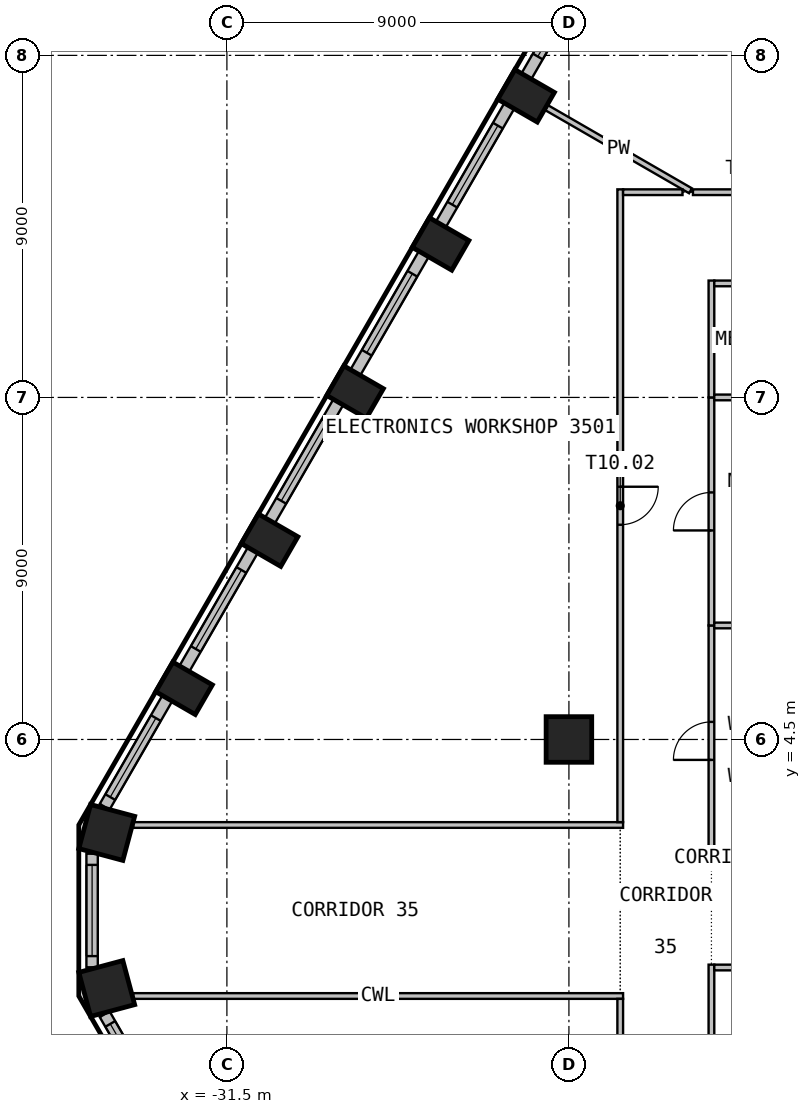
"""IFC4 building model, lengths in metres.
Left out: names, types, materials, properties, quantities, classifications, styles, units other than length and angle.
Written with IfcOpenShell. Run it as: python <this file> out.ifc"""

import sys

from ifc_helpers import new_model, si_unit, direction, frame, frame_2d, origin, origin_2d, place, context, subcontext, project, spatial, rectangle, circle, extrude, element, fill, save


model = new_model("IFC4")
c1 = context("Model", 3, precision=1e-05, world=origin(), true_north=direction((0.0, 1.0)))
c2 = subcontext(c1, "Body", "Model", "MODEL_VIEW")
j1 = project(units=[si_unit("LENGTHUNIT", "METRE"), si_unit("PLANEANGLEUNIT", "RADIAN")], contexts=[c1])
p1 = place(None, origin())
s1 = spatial("IfcSite", under=j1, at=p1, CompositionType="ELEMENT")
p2 = place(p1, origin())
s2 = spatial("IfcBuilding", under=s1, at=p2, CompositionType="ELEMENT")
p3 = place(p2, frame((0.0, 0.0, 144.3)))
s3 = spatial("IfcBuildingStorey", under=s2, at=p3, CompositionType="ELEMENT", Elevation=144.3)
for number, where, z_axis, x_axis in (
    (1, (-23.627, 21.436, 0.0), (0.0, 0.0, 1.0), (-0.5, -0.866, 0.0)),
    (2, (-25.877, 17.539, 0.0), (0.0, 0.0, 1.0), (-0.5, -0.866, 0.0)),
    (3, (-28.127, 13.641, 0.0), (0.0, 0.0, 1.0), (-0.5, -0.866, 0.0)),
    (4, (-30.377, 9.744, 0.0), (0.0, 0.0, 1.0), (-0.5, -0.866, 0.0)),
    (5, (-32.627, 5.847, 0.0), (0.0, 0.0, 1.0), (-0.5, -0.866, 0.0)),
):
    element("IfcColumn", number, at=place(p3, frame(where, z_axis=z_axis, x_axis=x_axis)), inside=s3, PredefinedType="COLUMN", context=c2, shape_type="SweptSolid", body=[
        extrude(rectangle(XDim=0.9, YDim=1.2, at=origin_2d()), origin(), (0.0, 0.0, 1.0), 3.575),
    ])
for number, where, z_axis, x_axis in (
    (6, (-34.662, 2.053, 0.0), (0.0, 0.0, 1.0), (-0.259, -0.966, 0.0)),
    (7, (-34.662, -2.053, 0.0), (0.0, 0.0, 1.0), (0.259, -0.966, 0.0)),
):
    element("IfcColumn", number, at=place(p3, frame(where, z_axis=z_axis, x_axis=x_axis)), inside=s3, PredefinedType="COLUMN", context=c2, shape_type="SweptSolid", body=[
        extrude(rectangle(XDim=1.2, YDim=1.2, at=origin_2d()), origin(), (0.0, 0.0, 1.0), 3.575),
    ])
p4 = place(p3, frame((-22.5, 4.5, 0.0), z_axis=(0.0, 0.0, 1.0), x_axis=(1.0, 0.0, 0.0)))
e8 = element("IfcColumn", 8, at=p4, inside=s3, PredefinedType="COLUMN", context=c2, shape_type="SweptSolid", body=[
    extrude(circle(Radius=0.6, at=origin_2d()), origin(), (0.0, 0.0, 1.0), 3.575),
])
p5 = place(p3, frame((-21.972, 24.803, 0.0), z_axis=(0.0, 0.0, 1.0), x_axis=(-0.500036802197, -0.866004154983, 0.0)))
e9 = element("IfcWall", 9, at=p5, inside=s3, PredefinedType="SOLIDWALL", context=c2, shape_type="SweptSolid", body=[
    extrude(rectangle(XDim=3.294, YDim=0.3, at=frame_2d((1.647, 0.0))), origin(), (0.0, 0.0, 1.0), 3.575),
])
p6 = place(p5, frame((0.294, 0.0, 0.9)))
e10 = element("IfcOpeningElement", 10, at=p6, cuts=e9, PredefinedType="OPENING", context=c2, shape_type="SweptSolid", body=[
    extrude(rectangle(XDim=2.4, YDim=2.1, at=frame_2d((1.2, 1.05))), frame((0.0, 0.16, 0.0), z_axis=(0.0, -1.0, 0.0), x_axis=(1.0, 0.0, 0.0)), (0.0, 0.0, 1.0), 0.32),
])
p7 = place(p3, frame((-24.069, 21.17, 0.0), z_axis=(0.0, 0.0, 1.0), x_axis=(-0.500027802648, -0.866009351323, 0.0)))
e11 = element("IfcWall", 11, at=p7, inside=s3, PredefinedType="SOLIDWALL", context=c2, shape_type="SweptSolid", body=[
    extrude(rectangle(XDim=3.599, YDim=0.3, at=frame_2d((1.799, 0.0))), origin(), (0.0, 0.0, 1.0), 3.575),
])
p8 = place(p7, frame((0.6, 0.0, 0.9)))
e12 = element("IfcOpeningElement", 12, at=p8, cuts=e11, PredefinedType="OPENING", context=c2, shape_type="SweptSolid", body=[
    extrude(rectangle(XDim=2.4, YDim=2.1, at=frame_2d((1.2, 1.05))), frame((0.0, 0.16, 0.0), z_axis=(0.0, -1.0, 0.0), x_axis=(1.0, 0.0, 0.0)), (0.0, 0.0, 1.0), 0.32),
])
p9 = place(p3, frame((-26.319, 17.273, 0.0), z_axis=(0.0, 0.0, 1.0), x_axis=(-0.500027802648, -0.866009351323, 0.0)))
e13 = element("IfcWall", 13, at=p9, inside=s3, PredefinedType="SOLIDWALL", context=c2, shape_type="SweptSolid", body=[
    extrude(rectangle(XDim=3.599, YDim=0.3, at=frame_2d((1.799, 0.0))), origin(), (0.0, 0.0, 1.0), 3.575),
])
p10 = place(p9, frame((0.6, 0.0, 0.9)))
e14 = element("IfcOpeningElement", 14, at=p10, cuts=e13, PredefinedType="OPENING", context=c2, shape_type="SweptSolid", body=[
    extrude(rectangle(XDim=2.4, YDim=2.1, at=frame_2d((1.2, 1.05))), frame((0.0, 0.16, 0.0), z_axis=(0.0, -1.0, 0.0), x_axis=(1.0, 0.0, 0.0)), (0.0, 0.0, 1.0), 0.32),
])
p11 = place(p3, frame((-28.569, 13.376, 0.0), z_axis=(0.0, 0.0, 1.0), x_axis=(-0.500027802648, -0.866009351323, 0.0)))
e15 = element("IfcWall", 15, at=p11, inside=s3, PredefinedType="SOLIDWALL", context=c2, shape_type="SweptSolid", body=[
    extrude(rectangle(XDim=3.599, YDim=0.3, at=frame_2d((1.799, 0.0))), origin(), (0.0, 0.0, 1.0), 3.575),
])
p12 = place(p11, frame((0.6, 0.0, 0.9)))
e16 = element("IfcOpeningElement", 16, at=p12, cuts=e15, PredefinedType="OPENING", context=c2, shape_type="SweptSolid", body=[
    extrude(rectangle(XDim=2.4, YDim=2.1, at=frame_2d((1.2, 1.05))), frame((0.0, 0.16, 0.0), z_axis=(0.0, -1.0, 0.0), x_axis=(1.0, 0.0, 0.0)), (0.0, 0.0, 1.0), 0.32),
])
p13 = place(p3, frame((-30.819, 9.479, 0.0), z_axis=(0.0, 0.0, 1.0), x_axis=(-0.500027802648, -0.866009351323, 0.0)))
e17 = element("IfcWall", 17, at=p13, inside=s3, PredefinedType="SOLIDWALL", context=c2, shape_type="SweptSolid", body=[
    extrude(rectangle(XDim=3.599, YDim=0.3, at=frame_2d((1.799, 0.0))), origin(), (0.0, 0.0, 1.0), 3.575),
])
p14 = place(p13, frame((0.6, 0.0, 0.9)))
e18 = element("IfcOpeningElement", 18, at=p14, cuts=e17, PredefinedType="OPENING", context=c2, shape_type="SweptSolid", body=[
    extrude(rectangle(XDim=2.4, YDim=2.1, at=frame_2d((1.2, 1.05))), frame((0.0, 0.16, 0.0), z_axis=(0.0, -1.0, 0.0), x_axis=(1.0, 0.0, 0.0)), (0.0, 0.0, 1.0), 0.32),
])
p15 = place(p3, frame((-33.069, 5.582, 0.0), z_axis=(0.0, 0.0, 1.0), x_axis=(-0.499981217486, -0.866036247602, 0.0)))
e19 = element("IfcWall", 19, at=p15, inside=s3, PredefinedType="SOLIDWALL", context=c2, shape_type="SweptSolid", body=[
    extrude(rectangle(XDim=3.294, YDim=0.3, at=frame_2d((1.647, 0.0))), origin(), (0.0, 0.0, 1.0), 3.575),
])
p16 = place(p15, frame((0.6, 0.0, 0.9)))
e20 = element("IfcOpeningElement", 20, at=p16, cuts=e19, PredefinedType="OPENING", context=c2, shape_type="SweptSolid", body=[
    extrude(rectangle(XDim=2.4, YDim=2.1, at=frame_2d((1.2, 1.05))), frame((0.0, 0.16, 0.0), z_axis=(0.0, -1.0, 0.0), x_axis=(1.0, 0.0, 0.0)), (0.0, 0.0, 1.0), 0.32),
])
p17 = place(p3, frame((-35.047, 1.495, 0.0), z_axis=(0.0, 0.0, 1.0), x_axis=(0.0, -1.0, 0.0)))
e21 = element("IfcWall", 21, at=p17, inside=s3, PredefinedType="SOLIDWALL", context=c2, shape_type="SweptSolid", body=[
    extrude(rectangle(XDim=2.989, YDim=0.3, at=frame_2d((1.495, 0.0))), origin(), (0.0, 0.0, 1.0), 3.575),
])
p18 = place(p17, frame((0.295, 0.0, 0.9)))
e22 = element("IfcOpeningElement", 22, at=p18, cuts=e21, PredefinedType="OPENING", context=c2, shape_type="SweptSolid", body=[
    extrude(rectangle(XDim=2.4, YDim=2.1, at=frame_2d((1.2, 1.05))), frame((0.0, 0.16, 0.0), z_axis=(0.0, -1.0, 0.0), x_axis=(1.0, 0.0, 0.0)), (0.0, 0.0, 1.0), 0.32),
])
p19 = place(p3, frame((-34.716, -2.729, 0.0), z_axis=(0.0, 0.0, 1.0), x_axis=(0.499981217486, -0.866036247602, 0.0)))
e23 = element("IfcWall", 23, at=p19, inside=s3, PredefinedType="SOLIDWALL", context=c2, shape_type="SweptSolid", body=[
    extrude(rectangle(XDim=3.294, YDim=0.3, at=frame_2d((1.647, 0.0))), origin(), (0.0, 0.0, 1.0), 3.575),
])
p20 = place(p19, frame((0.295, 0.0, 0.9)))
e24 = element("IfcOpeningElement", 24, at=p20, cuts=e23, PredefinedType="OPENING", context=c2, shape_type="SweptSolid", body=[
    extrude(rectangle(XDim=2.4, YDim=2.1, at=frame_2d((1.2, 1.05))), frame((0.0, 0.16, 0.0), z_axis=(0.0, -1.0, 0.0), x_axis=(1.0, 0.0, 0.0)), (0.0, 0.0, 1.0), 0.32),
])
for number, where, z_axis, x_axis in (
    (25, (-21.075, -2.25, 0.0), (0.0, 0.0, 1.0), (-1.0, 0.0, 0.0)),
    (26, (-33.968, 2.25, 0.0), (0.0, 0.0, 1.0), (1.0, 0.0, 0.0)),
):
    element("IfcWall", number, at=place(p3, frame(where, z_axis=z_axis, x_axis=x_axis)), inside=s3, PredefinedType="PARTITIONING", context=c2, shape_type="SweptSolid", body=[
        extrude(rectangle(XDim=12.893, YDim=0.15, at=frame_2d((6.446, 0.0))), origin(), (0.0, 0.0, 1.0), 3.575),
    ])
p21 = place(p3, frame((-23.09, 21.126, 0.0), z_axis=(0.0, 0.0, 1.0), x_axis=(0.865968165673, -0.500099126214, 0.0)))
e27 = element("IfcWall", 27, at=p21, inside=s3, PredefinedType="PARTITIONING", context=c2, shape_type="SweptSolid", body=[
    extrude(rectangle(XDim=4.376, YDim=0.15, at=frame_2d((2.188, 0.0))), origin(), (0.0, 0.0, 1.0), 3.575),
])
p22 = place(p3, frame((-21.15, -2.325, 0.0), z_axis=(0.0, 0.0, 1.0), x_axis=(0.0, -1.0, 0.0)))
e28 = element("IfcWall", 28, at=p22, inside=s3, PredefinedType="PARTITIONING", context=c2, shape_type="SweptSolid", body=[
    extrude(rectangle(XDim=16.65, YDim=0.15, at=frame_2d((8.325, 0.0))), origin(), (0.0, 0.0, 1.0), 3.575),
])
p23 = place(p22, frame((7.825, 0.0, 0.0)))
e29 = element("IfcOpeningElement", 29, at=p23, cuts=e28, PredefinedType="OPENING", context=c2, shape_type="SweptSolid", body=[
    extrude(rectangle(XDim=1.0, YDim=2.1, at=frame_2d((0.5, 1.05))), frame((0.0, 0.085, 0.0), z_axis=(0.0, -1.0, 0.0), x_axis=(1.0, 0.0, 0.0)), (0.0, 0.0, 1.0), 0.17),
])
p24 = place(p3, frame((-21.15, 18.975, 0.0), z_axis=(0.0, 0.0, 1.0), x_axis=(0.0, -1.0, 0.0)))
e30 = element("IfcWall", 30, at=p24, inside=s3, PredefinedType="PARTITIONING", context=c2, shape_type="SweptSolid", body=[
    extrude(rectangle(XDim=16.65, YDim=0.15, at=frame_2d((8.325, 0.0))), origin(), (0.0, 0.0, 1.0), 3.575),
])
p25 = place(p24, frame((7.825, 0.0, 0.0)))
e31 = element("IfcOpeningElement", 31, at=p25, cuts=e30, PredefinedType="OPENING", context=c2, shape_type="SweptSolid", body=[
    extrude(rectangle(XDim=1.0, YDim=2.1, at=frame_2d((0.5, 1.05))), frame((0.0, 0.085, 0.0), z_axis=(0.0, -1.0, 0.0), x_axis=(1.0, 0.0, 0.0)), (0.0, 0.0, 1.0), 0.17),
])
p26 = place(p3, frame((-19.511, 18.9, 0.0), z_axis=(0.0, 0.0, 1.0), x_axis=(-1.0, 0.0, 0.0)))
e32 = element("IfcWall", 32, at=p26, inside=s3, PredefinedType="PARTITIONING", context=c2, shape_type="SweptSolid", body=[
    extrude(rectangle(XDim=1.564, YDim=0.15, at=frame_2d((0.782, 0.0))), origin(), (0.0, 0.0, 1.0), 3.575),
])
p27 = place(p3, frame((-15.688, 18.9, 0.0), z_axis=(0.0, 0.0, 1.0), x_axis=(-1.0, 0.0, 0.0)))
e33 = element("IfcWall", 33, at=p27, inside=s3, PredefinedType="PARTITIONING", context=c2, shape_type="SweptSolid", body=[
    extrude(rectangle(XDim=3.548, YDim=0.15, at=frame_2d((1.774, 0.0))), origin(), (0.0, 0.0, 1.0), 3.575),
])
p28 = place(p27, frame((1.274, 0.0, 0.0)))
e34 = element("IfcOpeningElement", 34, at=p28, cuts=e33, PredefinedType="OPENING", context=c2, shape_type="SweptSolid", body=[
    extrude(rectangle(XDim=1.0, YDim=2.1, at=frame_2d((0.5, 1.05))), frame((0.0, 0.085, 0.0), z_axis=(0.0, -1.0, 0.0), x_axis=(1.0, 0.0, 0.0)), (0.0, 0.0, 1.0), 0.17),
])
p29 = place(p3, frame((-18.75, -13.5, 0.0), z_axis=(0.0, 0.0, 1.0), x_axis=(0.0, 1.0, 0.0)))
e35 = element("IfcWall", 35, at=p29, inside=s3, PredefinedType="PARTITIONING", context=c2, shape_type="SweptSolid", body=[
    extrude(rectangle(XDim=12.075, YDim=0.15, at=frame_2d((6.038, 0.0))), origin(), (0.0, 0.0, 1.0), 3.575),
])
p30 = place(p29, frame((5.538, 0.0, 0.0)))
e36 = element("IfcOpeningElement", 36, at=p30, cuts=e35, PredefinedType="OPENING", context=c2, shape_type="SweptSolid", body=[
    extrude(rectangle(XDim=1.0, YDim=2.1, at=frame_2d((0.5, 1.05))), frame((0.0, 0.085, 0.0), z_axis=(0.0, -1.0, 0.0), x_axis=(1.0, 0.0, 0.0)), (0.0, 0.0, 1.0), 0.17),
])
p31 = place(p3, frame((-18.675, -1.5, 0.0), z_axis=(0.0, 0.0, 1.0), x_axis=(1.0, 0.0, 0.0)))
e37 = element("IfcWall", 37, at=p31, inside=s3, PredefinedType="PARTITIONING", context=c2, shape_type="SweptSolid", body=[
    extrude(rectangle(XDim=2.925, YDim=0.15, at=frame_2d((1.462, 0.0))), origin(), (0.0, 0.0, 1.0), 3.575),
])
p32 = place(p3, frame((-18.75, 1.425, 0.0), z_axis=(0.0, 0.0, 1.0), x_axis=(0.0, 1.0, 0.0)))
e38 = element("IfcWall", 38, at=p32, inside=s3, PredefinedType="PARTITIONING", context=c2, shape_type="SweptSolid", body=[
    extrude(rectangle(XDim=6.075, YDim=0.15, at=frame_2d((3.038, 0.0))), origin(), (0.0, 0.0, 1.0), 3.575),
])
p33 = place(p32, frame((2.538, 0.0, 0.0)))
e39 = element("IfcOpeningElement", 39, at=p33, cuts=e38, PredefinedType="OPENING", context=c2, shape_type="SweptSolid", body=[
    extrude(rectangle(XDim=1.0, YDim=2.1, at=frame_2d((0.5, 1.05))), frame((0.0, 0.085, 0.0), z_axis=(0.0, -1.0, 0.0), x_axis=(1.0, 0.0, 0.0)), (0.0, 0.0, 1.0), 0.17),
])
p34 = place(p3, frame((-15.75, 1.5, 0.0), z_axis=(0.0, 0.0, 1.0), x_axis=(-1.0, 0.0, 0.0)))
e40 = element("IfcWall", 40, at=p34, inside=s3, PredefinedType="PARTITIONING", context=c2, shape_type="SweptSolid", body=[
    extrude(rectangle(XDim=2.925, YDim=0.15, at=frame_2d((1.462, 0.0))), origin(), (0.0, 0.0, 1.0), 3.575),
])
p35 = place(p3, frame((-18.75, 7.5, 0.0), z_axis=(0.0, 0.0, 1.0), x_axis=(0.0, 1.0, 0.0)))
e41 = element("IfcWall", 41, at=p35, inside=s3, PredefinedType="PARTITIONING", context=c2, shape_type="SweptSolid", body=[
    extrude(rectangle(XDim=6.0, YDim=0.15, at=frame_2d((3.0, 0.0))), origin(), (0.0, 0.0, 1.0), 3.575),
])
p36 = place(p35, frame((2.5, 0.0, 0.0)))
e42 = element("IfcOpeningElement", 42, at=p36, cuts=e41, PredefinedType="OPENING", context=c2, shape_type="SweptSolid", body=[
    extrude(rectangle(XDim=1.0, YDim=2.1, at=frame_2d((0.5, 1.05))), frame((0.0, 0.085, 0.0), z_axis=(0.0, -1.0, 0.0), x_axis=(1.0, 0.0, 0.0)), (0.0, 0.0, 1.0), 0.17),
])
p37 = place(p3, frame((-18.675, 7.5, 0.0), z_axis=(0.0, 0.0, 1.0), x_axis=(1.0, 0.0, 0.0)))
e43 = element("IfcWall", 43, at=p37, inside=s3, PredefinedType="PARTITIONING", context=c2, shape_type="SweptSolid", body=[
    extrude(rectangle(XDim=2.925, YDim=0.15, at=frame_2d((1.462, 0.0))), origin(), (0.0, 0.0, 1.0), 3.575),
])
p38 = place(p3, frame((-18.75, 13.5, 0.0), z_axis=(0.0, 0.0, 1.0), x_axis=(0.0, 1.0, 0.0)))
e44 = element("IfcWall", 44, at=p38, inside=s3, PredefinedType="PARTITIONING", context=c2, shape_type="SweptSolid", body=[
    extrude(rectangle(XDim=3.075, YDim=0.15, at=frame_2d((1.538, 0.0))), origin(), (0.0, 0.0, 1.0), 3.575),
])
p39 = place(p3, frame((-18.675, 13.5, 0.0), z_axis=(0.0, 0.0, 1.0), x_axis=(1.0, 0.0, 0.0)))
e45 = element("IfcWall", 45, at=p39, inside=s3, PredefinedType="PARTITIONING", context=c2, shape_type="SweptSolid", body=[
    extrude(rectangle(XDim=2.925, YDim=0.15, at=frame_2d((1.462, 0.0))), origin(), (0.0, 0.0, 1.0), 3.575),
])
p40 = place(p3, frame((-18.675, 16.5, 0.0), z_axis=(0.0, 0.0, 1.0), x_axis=(1.0, 0.0, 0.0)))
e46 = element("IfcWall", 46, at=p40, inside=s3, PredefinedType="PARTITIONING", context=c2, shape_type="SweptSolid", body=[
    extrude(rectangle(XDim=5.4, YDim=0.15, at=frame_2d((2.7, 0.0))), origin(), (0.0, 0.0, 1.0), 3.575),
])
p41 = place(p40, frame((2.2, 0.0, 0.0)))
e47 = element("IfcOpeningElement", 47, at=p41, cuts=e46, PredefinedType="OPENING", context=c2, shape_type="SweptSolid", body=[
    extrude(rectangle(XDim=1.0, YDim=2.1, at=frame_2d((0.5, 1.05))), frame((0.0, 0.085, 0.0), z_axis=(0.0, -1.0, 0.0), x_axis=(1.0, 0.0, 0.0)), (0.0, 0.0, 1.0), 0.17),
])
p42 = place(p6, origin())
e48 = element("IfcWindow", 48, at=p42, inside=s3, PartitioningType="SINGLE_PANEL", PredefinedType="WINDOW", context=c2, shape_type="SweptSolid", body=[
    extrude(rectangle(XDim=2.4, YDim=2.1, at=frame_2d((1.2, 1.05))), frame((0.0, 0.03, 0.0), z_axis=(0.0, -1.0, 0.0), x_axis=(1.0, 0.0, 0.0)), (0.0, 0.0, 1.0), 0.06),
])
fill(e10, e48)
p43 = place(p8, origin())
e49 = element("IfcWindow", 49, at=p43, inside=s3, PartitioningType="SINGLE_PANEL", PredefinedType="WINDOW", context=c2, shape_type="SweptSolid", body=[
    extrude(rectangle(XDim=2.4, YDim=2.1, at=frame_2d((1.2, 1.05))), frame((0.0, 0.03, 0.0), z_axis=(0.0, -1.0, 0.0), x_axis=(1.0, 0.0, 0.0)), (0.0, 0.0, 1.0), 0.06),
])
fill(e12, e49)
p44 = place(p10, origin())
e50 = element("IfcWindow", 50, at=p44, inside=s3, PartitioningType="SINGLE_PANEL", PredefinedType="WINDOW", context=c2, shape_type="SweptSolid", body=[
    extrude(rectangle(XDim=2.4, YDim=2.1, at=frame_2d((1.2, 1.05))), frame((0.0, 0.03, 0.0), z_axis=(0.0, -1.0, 0.0), x_axis=(1.0, 0.0, 0.0)), (0.0, 0.0, 1.0), 0.06),
])
fill(e14, e50)
p45 = place(p12, origin())
e51 = element("IfcWindow", 51, at=p45, inside=s3, PartitioningType="SINGLE_PANEL", PredefinedType="WINDOW", context=c2, shape_type="SweptSolid", body=[
    extrude(rectangle(XDim=2.4, YDim=2.1, at=frame_2d((1.2, 1.05))), frame((0.0, 0.03, 0.0), z_axis=(0.0, -1.0, 0.0), x_axis=(1.0, 0.0, 0.0)), (0.0, 0.0, 1.0), 0.06),
])
fill(e16, e51)
p46 = place(p14, origin())
e52 = element("IfcWindow", 52, at=p46, inside=s3, PartitioningType="SINGLE_PANEL", PredefinedType="WINDOW", context=c2, shape_type="SweptSolid", body=[
    extrude(rectangle(XDim=2.4, YDim=2.1, at=frame_2d((1.2, 1.05))), frame((0.0, 0.03, 0.0), z_axis=(0.0, -1.0, 0.0), x_axis=(1.0, 0.0, 0.0)), (0.0, 0.0, 1.0), 0.06),
])
fill(e18, e52)
p47 = place(p16, origin())
e53 = element("IfcWindow", 53, at=p47, inside=s3, PartitioningType="SINGLE_PANEL", PredefinedType="WINDOW", context=c2, shape_type="SweptSolid", body=[
    extrude(rectangle(XDim=2.4, YDim=2.1, at=frame_2d((1.2, 1.05))), frame((0.0, 0.03, 0.0), z_axis=(0.0, -1.0, 0.0), x_axis=(1.0, 0.0, 0.0)), (0.0, 0.0, 1.0), 0.06),
])
fill(e20, e53)
p48 = place(p18, origin())
e54 = element("IfcWindow", 54, at=p48, inside=s3, PartitioningType="SINGLE_PANEL", PredefinedType="WINDOW", context=c2, shape_type="SweptSolid", body=[
    extrude(rectangle(XDim=2.4, YDim=2.1, at=frame_2d((1.2, 1.05))), frame((0.0, 0.03, 0.0), z_axis=(0.0, -1.0, 0.0), x_axis=(1.0, 0.0, 0.0)), (0.0, 0.0, 1.0), 0.06),
])
fill(e22, e54)
p49 = place(p20, origin())
e55 = element("IfcWindow", 55, at=p49, inside=s3, PartitioningType="SINGLE_PANEL", PredefinedType="WINDOW", context=c2, shape_type="SweptSolid", body=[
    extrude(rectangle(XDim=2.4, YDim=2.1, at=frame_2d((1.2, 1.05))), frame((0.0, 0.03, 0.0), z_axis=(0.0, -1.0, 0.0), x_axis=(1.0, 0.0, 0.0)), (0.0, 0.0, 1.0), 0.06),
])
fill(e24, e55)
p50 = place(p25, origin())
e56 = element("IfcDoor", 56, at=p50, inside=s3, OperationType="SINGLE_SWING_LEFT", PredefinedType="DOOR", context=c2, shape_type="SweptSolid", body=[
    extrude(rectangle(XDim=1.0, YDim=2.1, at=frame_2d((0.5, 1.05))), frame((0.0, 0.025, 0.0), z_axis=(0.0, -1.0, 0.0), x_axis=(1.0, 0.0, 0.0)), (0.0, 0.0, 1.0), 0.05),
])
fill(e31, e56)
p51 = place(p33, origin())
e57 = element("IfcDoor", 57, at=p51, inside=s3, OperationType="SINGLE_SWING_RIGHT", PredefinedType="DOOR", context=c2, shape_type="SweptSolid", body=[
    extrude(rectangle(XDim=1.0, YDim=2.1, at=frame_2d((0.5, 1.05))), frame((0.0, 0.025, 0.0), z_axis=(0.0, -1.0, 0.0), x_axis=(1.0, 0.0, 0.0)), (0.0, 0.0, 1.0), 0.05),
])
fill(e39, e57)
p52 = place(p36, origin())
e58 = element("IfcDoor", 58, at=p52, inside=s3, OperationType="SINGLE_SWING_LEFT", PredefinedType="DOOR", context=c2, shape_type="SweptSolid", body=[
    extrude(rectangle(XDim=1.0, YDim=2.1, at=frame_2d((0.5, 1.05))), frame((0.0, 0.025, 0.0), z_axis=(0.0, -1.0, 0.0), x_axis=(1.0, 0.0, 0.0)), (0.0, 0.0, 1.0), 0.05),
])
fill(e42, e58)
save(model, sys.argv[1])
